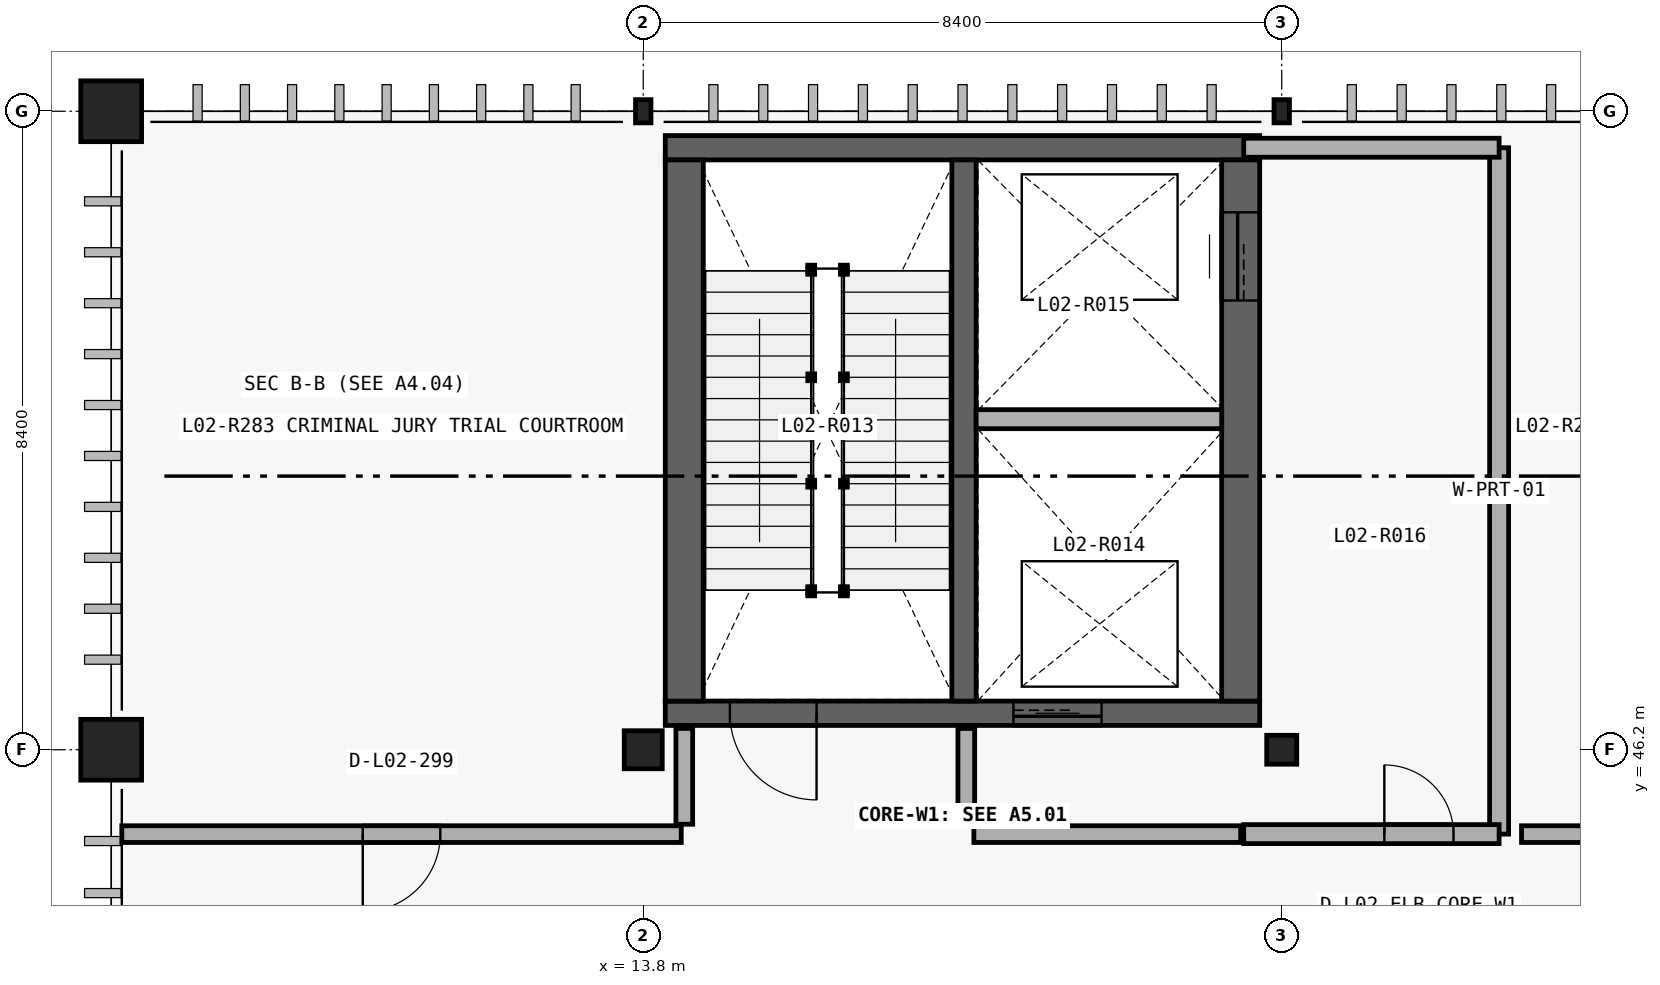
"""IFC4 building model, lengths in metres.
Left out: names, types, materials, properties, quantities, classifications, styles, units other than length and angle.
Written with IfcOpenShell. Run it as: python <this file> out.ifc"""

import sys

from ifc_helpers import new_model, si_unit, direction, frame, frame_2d, origin_with_axes, origin_2d_with_axis, place, context, subcontext, project, spatial, rectangle, hollow_rectangle, circle, i_section, extrude, element, fill, save


model = new_model("IFC4")
c1 = context("Model", 3, precision=1e-05, world=origin_with_axes(), true_north=direction((0.0, 1.0)))
c2 = subcontext(c1, "Body", "Model", "MODEL_VIEW")
j1 = project(units=[si_unit("LENGTHUNIT", "METRE"), si_unit("PLANEANGLEUNIT", "RADIAN")], contexts=[c1])
p1 = place(None, origin_with_axes())
s1 = spatial("IfcSite", under=j1, at=p1, CompositionType="ELEMENT")
p2 = place(p1, origin_with_axes())
s2 = spatial("IfcBuilding", under=s1, at=p2, CompositionType="ELEMENT")
p3 = place(p2, frame((0.0, 0.0, 10.8), z_axis=(0.0, 0.0, 1.0), x_axis=(1.0, 0.0, 0.0)))
s3 = spatial("IfcBuildingStorey", under=s2, at=p3, CompositionType="ELEMENT", Elevation=10.8)
p4 = place(None, frame((14.09, 46.68, 10.8), z_axis=(0.0, 0.0, 1.0), x_axis=(1.0, 0.0, 0.0)))
e1 = element("IfcWall", 1, at=p4, inside=s3, PredefinedType="SHEAR", context=c2, shape_type="SweptSolid", body=[
    extrude(rectangle(XDim=7.82, YDim=0.32, at=frame_2d((3.91, 0.0), x_axis=(1.0, 0.0))), origin_with_axes(), (0.0, 0.0, 1.0), 4.8),
])
p5 = place(None, frame((15.51, 46.68, 10.8), z_axis=(0.0, 0.0, 1.0), x_axis=(1.0, 0.0, 0.0)))
e2 = element("IfcOpeningElement", 2, at=p5, cuts=e1, PredefinedType="OPENING", context=c2, shape_type="SweptSolid", body=[
    extrude(rectangle(XDim=1.14, YDim=2.18, at=frame_2d((0.0, 1.09), x_axis=(1.0, 0.0))), frame((0.0, 0.17, 0.0), z_axis=(0.0, -1.0, 0.0), x_axis=(1.0, 0.0, 0.0)), (0.0, 0.0, 1.0), 0.34),
])
p6 = place(None, frame((19.25, 46.68, 10.8), z_axis=(0.0, 0.0, 1.0), x_axis=(1.0, 0.0, 0.0)))
e3 = element("IfcOpeningElement", 3, at=p6, cuts=e1, PredefinedType="OPENING", context=c2, shape_type="SweptSolid", body=[
    extrude(rectangle(XDim=1.16, YDim=2.2, at=frame_2d((0.0, 1.1), x_axis=(1.0, 0.0))), frame((0.0, 0.17, 0.0), z_axis=(0.0, -1.0, 0.0), x_axis=(1.0, 0.0, 0.0)), (0.0, 0.0, 1.0), 0.34),
])
p7 = place(None, frame((21.91, 54.12, 10.8), z_axis=(0.0, 0.0, 1.0), x_axis=(-1.0, 0.0, 0.0)))
e4 = element("IfcWall", 4, at=p7, inside=s3, PredefinedType="SHEAR", context=c2, shape_type="SweptSolid", body=[
    extrude(rectangle(XDim=7.82, YDim=0.32, at=frame_2d((3.91, 0.0), x_axis=(1.0, 0.0))), origin_with_axes(), (0.0, 0.0, 1.0), 4.8),
])
p8 = place(None, frame((21.66, 46.84, 10.8), z_axis=(0.0, 0.0, 1.0), x_axis=(0.0, 1.0, 0.0)))
e5 = element("IfcWall", 5, at=p8, inside=s3, PredefinedType="SHEAR", context=c2, shape_type="SweptSolid", body=[
    extrude(rectangle(XDim=7.12, YDim=0.5, at=frame_2d((3.56, 0.0), x_axis=(1.0, 0.0))), origin_with_axes(), (0.0, 0.0, 1.0), 4.8),
])
p9 = place(None, frame((21.66, 52.69, 10.8), z_axis=(0.0, 0.0, 1.0), x_axis=(0.0, 1.0, 0.0)))
e6 = element("IfcOpeningElement", 6, at=p9, cuts=e5, PredefinedType="OPENING", context=c2, shape_type="SweptSolid", body=[
    extrude(rectangle(XDim=1.16, YDim=2.2, at=frame_2d((0.0, 1.1), x_axis=(1.0, 0.0))), frame((0.0, 0.26, 0.0), z_axis=(0.0, -1.0, 0.0), x_axis=(1.0, 0.0, 0.0)), (0.0, 0.0, 1.0), 0.52),
])
p10 = place(None, frame((14.34, 53.96, 10.8), z_axis=(0.0, 0.0, 1.0), x_axis=(0.0, -1.0, 0.0)))
e7 = element("IfcWall", 7, at=p10, inside=s3, PredefinedType="SHEAR", context=c2, shape_type="SweptSolid", body=[
    extrude(rectangle(XDim=7.12, YDim=0.5, at=frame_2d((3.56, 0.0), x_axis=(1.0, 0.0))), origin_with_axes(), (0.0, 0.0, 1.0), 4.8),
])
p11 = place(None, frame((18.02, 46.84, 10.8), z_axis=(0.0, 0.0, 1.0), x_axis=(0.0, 1.0, 0.0)))
e8 = element("IfcWall", 8, at=p11, inside=s3, PredefinedType="SHEAR", context=c2, shape_type="SweptSolid", body=[
    extrude(rectangle(XDim=7.12, YDim=0.32, at=frame_2d((3.56, 0.0), x_axis=(1.0, 0.0))), origin_with_axes(), (0.0, 0.0, 1.0), 4.8),
])
p12 = place(None, frame((18.18, 50.549, 10.8), z_axis=(0.0, 0.0, 1.0), x_axis=(1.0, 0.0, 0.0)))
e9 = element("IfcWall", 9, at=p12, inside=s3, PredefinedType="PARTITIONING", context=c2, shape_type="SweptSolid", body=[
    extrude(rectangle(XDim=3.23, YDim=0.25, at=frame_2d((1.615, 0.0), x_axis=(1.0, 0.0))), origin_with_axes(), (0.0, 0.0, 1.0), 4.44),
])
p13 = place(None, frame((25.06, 45.09, 10.8), z_axis=(0.0, 0.0, 1.0), x_axis=(0.0, 1.0, 0.0)))
e10 = element("IfcWall", 10, at=p13, inside=s3, PredefinedType="PARTITIONING", context=c2, shape_type="SweptSolid", body=[
    extrude(rectangle(XDim=9.03, YDim=0.25, at=frame_2d((4.515, 0.0), x_axis=(1.0, 0.0))), origin_with_axes(), (0.0, 0.0, 1.0), 4.44),
])
p14 = place(None, frame((21.7, 54.12, 10.8), z_axis=(0.0, 0.0, 1.0), x_axis=(1.0, 0.0, 0.0)))
e11 = element("IfcWall", 11, at=p14, inside=s3, PredefinedType="PARTITIONING", context=c2, shape_type="SweptSolid", body=[
    extrude(rectangle(XDim=3.36, YDim=0.25, at=frame_2d((1.68, 0.0), x_axis=(1.0, 0.0))), origin_with_axes(), (0.0, 0.0, 1.0), 4.44),
])
p15 = place(None, frame((21.7, 45.09, 10.8), z_axis=(0.0, 0.0, 1.0), x_axis=(1.0, 0.0, 0.0)))
e12 = element("IfcWall", 12, at=p15, inside=s3, PredefinedType="PARTITIONING", context=c2, shape_type="SweptSolid", body=[
    extrude(rectangle(XDim=3.36, YDim=0.25, at=frame_2d((1.68, 0.0), x_axis=(1.0, 0.0))), origin_with_axes(), (0.0, 0.0, 1.0), 4.44),
])
p16 = place(None, frame((24.005, 45.09, 10.8), z_axis=(0.0, 0.0, 1.0), x_axis=(1.0, 0.0, 0.0)))
e13 = element("IfcOpeningElement", 13, at=p16, cuts=e12, PredefinedType="OPENING", context=c2, shape_type="SweptSolid", body=[
    extrude(rectangle(XDim=0.91, YDim=2.12, at=frame_2d((0.0, 1.06), x_axis=(1.0, 0.0))), frame((0.0, 0.135, 0.0), z_axis=(0.0, -1.0, 0.0), x_axis=(1.0, 0.0, 0.0)), (0.0, 0.0, 1.0), 0.27),
])
for number, where, z_axis, x_axis in (
    (14, (14.34, 45.22, 10.8), (0.0, 0.0, 1.0), (0.0, 1.0, 0.0)),
    (15, (18.05, 45.22, 10.8), (0.0, 0.0, 1.0), (0.0, 1.0, 0.0)),
):
    element("IfcWall", number, at=place(None, frame(where, z_axis=z_axis, x_axis=x_axis)), inside=s3, PredefinedType="PARTITIONING", context=c2, shape_type="SweptSolid", body=[
        extrude(rectangle(XDim=1.26, YDim=0.22, at=frame_2d((0.63, 0.0), x_axis=(1.0, 0.0))), origin_with_axes(), (0.0, 0.0, 1.0), 4.44),
    ])
p17 = place(None, frame((6.94, 45.09, 10.8), z_axis=(0.0, 0.0, 1.0), x_axis=(1.0, 0.0, 0.0)))
e16 = element("IfcWall", 16, at=p17, inside=s3, PredefinedType="PARTITIONING", context=c2, shape_type="SweptSolid", body=[
    extrude(rectangle(XDim=7.36, YDim=0.22, at=frame_2d((3.68, 0.0), x_axis=(1.0, 0.0))), origin_with_axes(), (0.0, 0.0, 1.0), 4.44),
])
p18 = place(None, frame((10.62, 45.09, 10.8), z_axis=(0.0, 0.0, 1.0), x_axis=(1.0, 0.0, 0.0)))
e17 = element("IfcOpeningElement", 17, at=p18, cuts=e16, PredefinedType="OPENING", context=c2, shape_type="SweptSolid", body=[
    extrude(rectangle(XDim=1.02, YDim=2.36, at=frame_2d((0.0, 1.18), x_axis=(1.0, 0.0))), frame((0.0, 0.12, 0.0), z_axis=(0.0, -1.0, 0.0), x_axis=(1.0, 0.0, 0.0)), (0.0, 0.0, 1.0), 0.24),
])
p19 = place(None, frame((18.15, 45.09, 10.8), z_axis=(0.0, 0.0, 1.0), x_axis=(1.0, 0.0, 0.0)))
e18 = element("IfcWall", 18, at=p19, inside=s3, PredefinedType="PARTITIONING", context=c2, shape_type="SweptSolid", body=[
    extrude(rectangle(XDim=3.51, YDim=0.22, at=frame_2d((1.755, 0.0), x_axis=(1.0, 0.0))), origin_with_axes(), (0.0, 0.0, 1.0), 4.44),
])
p20 = place(None, frame((25.355, 45.09, 10.8), z_axis=(0.0, 0.0, 1.0), x_axis=(1.0, 0.0, 0.0)))
e19 = element("IfcWall", 19, at=p20, inside=s3, PredefinedType="PARTITIONING", context=c2, shape_type="SweptSolid", body=[
    extrude(rectangle(XDim=5.745, YDim=0.22, at=frame_2d((2.873, 0.0), x_axis=(1.0, 0.0))), origin_with_axes(), (0.0, 0.0, 1.0), 4.44),
])
p21 = place(None, frame((28.227, 45.09, 10.8), z_axis=(0.0, 0.0, 1.0), x_axis=(1.0, 0.0, 0.0)))
e20 = element("IfcOpeningElement", 20, at=p21, cuts=e19, PredefinedType="OPENING", context=c2, shape_type="SweptSolid", body=[
    extrude(rectangle(XDim=2.1, YDim=2.8, at=frame_2d((0.0, 1.4), x_axis=(1.0, 0.0))), frame((0.0, 0.12, 0.0), z_axis=(0.0, -1.0, 0.0), x_axis=(1.0, 0.0, 0.0)), (0.0, 0.0, 1.0), 0.24),
])
for number, where, z_axis, x_axis in (
    (21, (6.8, 46.2, 10.8), (0.0, 0.0, 1.0), (1.0, 0.0, 0.0)),
    (22, (6.8, 54.6, 10.8), (0.0, 0.0, 1.0), (1.0, 0.0, 0.0)),
):
    element("IfcColumn", number, at=place(None, frame(where, z_axis=z_axis, x_axis=x_axis)), inside=s3, PredefinedType="COLUMN", context=c2, shape_type="SweptSolid", body=[
        extrude(circle(Radius=0.4, at=origin_2d_with_axis()), origin_with_axes(), (0.0, 0.0, 1.0), 4.8),
    ])
p22 = place(None, frame((13.8, 46.2, 10.8), z_axis=(0.0, 0.0, 1.0), x_axis=(1.0, 0.0, 0.0)))
e23 = element("IfcColumn", 23, at=p22, inside=s3, PredefinedType="COLUMN", context=c2, shape_type="SweptSolid", body=[
    extrude(i_section(OverallWidth=0.5, OverallDepth=0.5, WebThickness=0.022, FlangeThickness=0.036, at=origin_2d_with_axis()), origin_with_axes(), (0.0, 0.0, 1.0), 4.8),
])
p23 = place(None, frame((13.8, 54.6, 10.8), z_axis=(0.0, 0.0, 1.0), x_axis=(1.0, 0.0, 0.0)))
e24 = element("IfcColumn", 24, at=p23, inside=s3, PredefinedType="COLUMN", context=c2, shape_type="SweptSolid", body=[
    extrude(hollow_rectangle(XDim=0.203, YDim=0.305, WallThickness=0.013, InnerFilletRadius=0.025, OuterFilletRadius=0.013, at=origin_2d_with_axis()), origin_with_axes(), (0.0, 0.0, 1.0), 4.8),
])
p24 = place(None, frame((22.2, 46.2, 10.8), z_axis=(0.0, 0.0, 1.0), x_axis=(1.0, 0.0, 0.0)))
e25 = element("IfcColumn", 25, at=p24, inside=s3, PredefinedType="COLUMN", context=c2, shape_type="SweptSolid", body=[
    extrude(i_section(OverallWidth=0.395, OverallDepth=0.38, WebThickness=0.019, FlangeThickness=0.03, at=origin_2d_with_axis()), origin_with_axes(), (0.0, 0.0, 1.0), 4.8),
])
p25 = place(None, frame((22.2, 54.6, 10.8), z_axis=(0.0, 0.0, 1.0), x_axis=(1.0, 0.0, 0.0)))
e26 = element("IfcColumn", 26, at=p25, inside=s3, PredefinedType="COLUMN", context=c2, shape_type="SweptSolid", body=[
    extrude(hollow_rectangle(XDim=0.203, YDim=0.305, WallThickness=0.013, InnerFilletRadius=0.025, OuterFilletRadius=0.013, at=origin_2d_with_axis()), origin_with_axes(), (0.0, 0.0, 1.0), 4.8),
])
p26 = place(None, frame((15.51, 46.68, 10.8), z_axis=(0.0, 0.0, 1.0), x_axis=(-1.0, 0.0, 0.0)))
e27 = element("IfcDoor", 27, at=p26, inside=s3, OperationType="SINGLE_SWING_RIGHT", PredefinedType="DOOR", context=c2, shape_type="SweptSolid", body=[
    extrude(rectangle(XDim=1.14, YDim=2.18, at=frame_2d((0.0, 1.09), x_axis=(1.0, 0.0))), frame((0.0, 0.04, 0.0), z_axis=(0.0, -1.0, 0.0), x_axis=(1.0, 0.0, 0.0)), (0.0, 0.0, 1.0), 0.08),
])
fill(e2, e27)
p27 = place(None, frame((19.25, 46.68, 10.8), z_axis=(0.0, 0.0, 1.0), x_axis=(-1.0, 0.0, 0.0)))
e28 = element("IfcDoor", 28, at=p27, inside=s3, OperationType="SLIDING_TO_LEFT", PredefinedType="DOOR", context=c2, shape_type="SweptSolid", body=[
    extrude(rectangle(XDim=1.16, YDim=2.2, at=frame_2d((0.0, 1.1), x_axis=(1.0, 0.0))), frame((0.0, 0.04, 0.0), z_axis=(0.0, -1.0, 0.0), x_axis=(1.0, 0.0, 0.0)), (0.0, 0.0, 1.0), 0.08),
])
fill(e3, e28)
p28 = place(None, frame((21.66, 52.69, 10.8), z_axis=(0.0, 0.0, 1.0), x_axis=(0.0, 1.0, 0.0)))
e29 = element("IfcDoor", 29, at=p28, inside=s3, OperationType="SLIDING_TO_LEFT", PredefinedType="DOOR", context=c2, shape_type="SweptSolid", body=[
    extrude(rectangle(XDim=1.16, YDim=2.2, at=frame_2d((0.0, 1.1), x_axis=(1.0, 0.0))), frame((0.0, 0.04, 0.0), z_axis=(0.0, -1.0, 0.0), x_axis=(1.0, 0.0, 0.0)), (0.0, 0.0, 1.0), 0.08),
])
fill(e6, e29)
p29 = place(None, frame((24.005, 45.09, 10.8), z_axis=(0.0, 0.0, 1.0), x_axis=(1.0, 0.0, 0.0)))
e30 = element("IfcDoor", 30, at=p29, inside=s3, OperationType="SINGLE_SWING_LEFT", PredefinedType="DOOR", context=c2, shape_type="SweptSolid", body=[
    extrude(rectangle(XDim=0.91, YDim=2.12, at=frame_2d((0.0, 1.06), x_axis=(1.0, 0.0))), frame((0.0, 0.04, 0.0), z_axis=(0.0, -1.0, 0.0), x_axis=(1.0, 0.0, 0.0)), (0.0, 0.0, 1.0), 0.08),
])
fill(e13, e30)
p30 = place(None, frame((10.62, 45.09, 10.8), z_axis=(0.0, 0.0, 1.0), x_axis=(-1.0, 0.0, 0.0)))
e31 = element("IfcDoor", 31, at=p30, inside=s3, OperationType="SINGLE_SWING_LEFT", PredefinedType="DOOR", context=c2, shape_type="SweptSolid", body=[
    extrude(rectangle(XDim=1.02, YDim=2.36, at=frame_2d((0.0, 1.18), x_axis=(1.0, 0.0))), frame((0.0, 0.04, 0.0), z_axis=(0.0, -1.0, 0.0), x_axis=(1.0, 0.0, 0.0)), (0.0, 0.0, 1.0), 0.08),
])
fill(e17, e31)
save(model, sys.argv[1])
